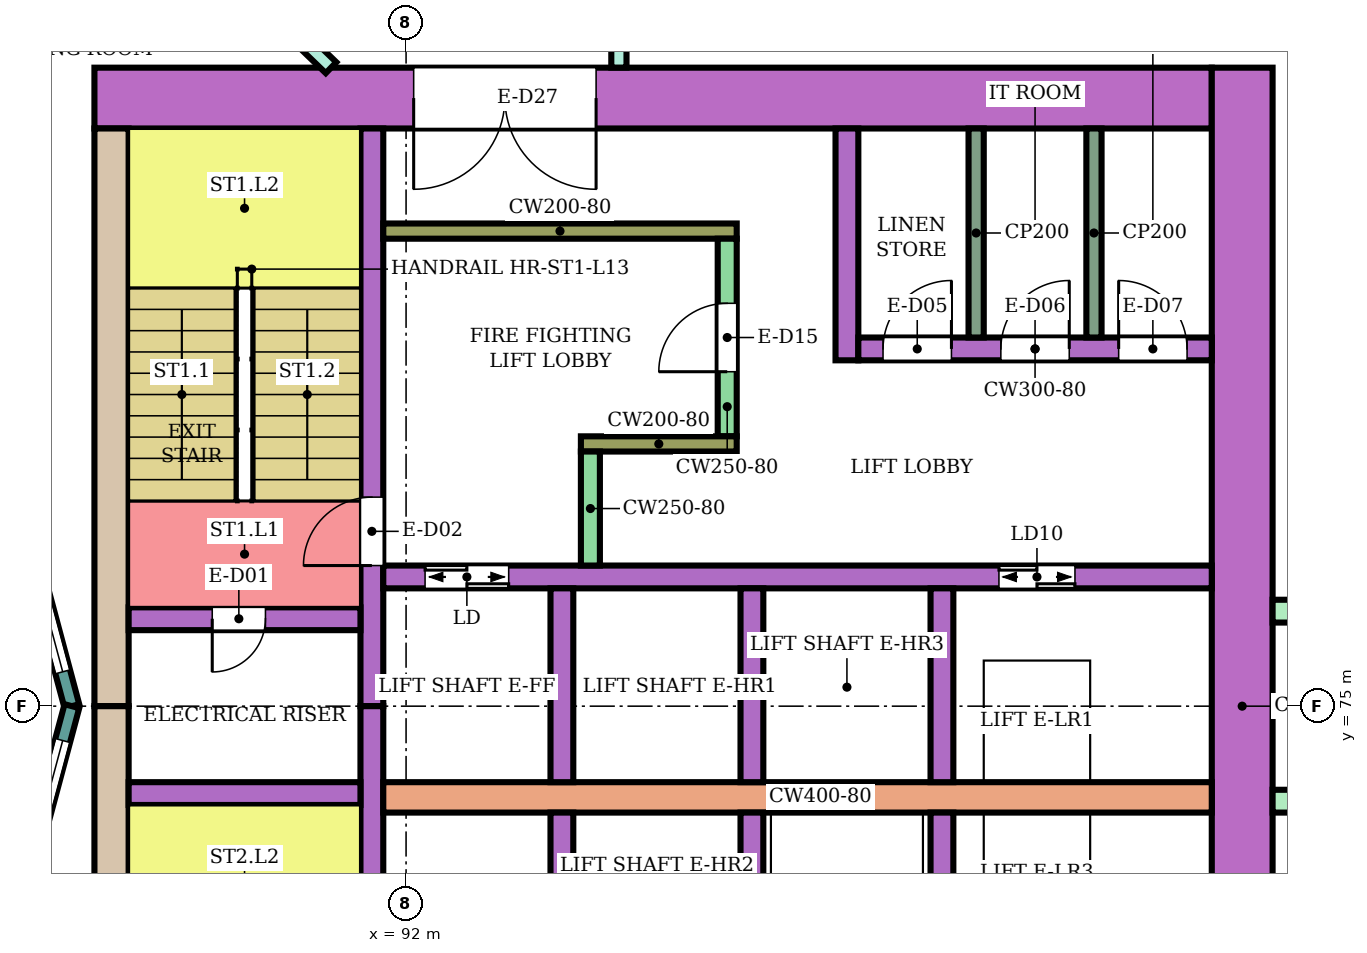
"""IFC4 building model, lengths in metres.
Left out: names, types, materials, properties, quantities, classifications, styles, units other than length and angle.
Written with IfcOpenShell. Run it as: python <this file> out.ifc"""

import sys

from ifc_helpers import new_model, si_unit, direction, frame, frame_2d, origin, place, context, subcontext, project, spatial, rectangle, extrude, element, fill, save


model = new_model("IFC4")
c1 = context("Model", 3, precision=1e-05, world=origin(), true_north=direction((0.0, 1.0)))
c2 = subcontext(c1, "Body", "Model", "MODEL_VIEW")
j1 = project(units=[si_unit("LENGTHUNIT", "METRE"), si_unit("PLANEANGLEUNIT", "RADIAN")], contexts=[c1])
p1 = place(None, origin())
s1 = spatial("IfcSite", under=j1, at=p1, CompositionType="ELEMENT")
p2 = place(p1, origin())
s2 = spatial("IfcBuilding", under=s1, at=p2, CompositionType="ELEMENT")
p3 = place(p2, frame((0.0, 0.0, 59.2)))
s3 = spatial("IfcBuildingStorey", under=s2, at=p3, CompositionType="ELEMENT", Elevation=59.2)
p4 = place(p3, frame((87.9, 83.0, 0.0), z_axis=(0.0, 0.0, 1.0), x_axis=(1.0, 0.0, 0.0)))
e1 = element("IfcWall", 1, at=p4, inside=s3, PredefinedType="SHEAR", context=c2, shape_type="SweptSolid", body=[
    extrude(rectangle(XDim=14.7, YDim=0.8, at=frame_2d((7.35, 0.0))), origin(), (0.0, 0.0, 1.0), 3.48),
])
p5 = place(p4, frame((4.2, 0.0, 0.0)))
e2 = element("IfcOpeningElement", 2, at=p5, cuts=e1, PredefinedType="OPENING", context=c2, shape_type="SweptSolid", body=[
    extrude(rectangle(XDim=2.4, YDim=2.4, at=frame_2d((1.2, 1.2))), frame((0.0, 0.41, 0.0), z_axis=(0.0, -1.0, 0.0), x_axis=(1.0, 0.0, 0.0)), (0.0, 0.0, 1.0), 0.82),
])
for number, where, z_axis, x_axis in (
    (3, (88.125, 75.0, 0.0), (0.0, 0.0, 1.0), (0.0, 1.0, 0.0)),
    (4, (88.125, 67.4, 0.0), (0.0, 0.0, 1.0), (0.0, 1.0, 0.0)),
):
    element("IfcWall", number, at=place(p3, frame(where, z_axis=z_axis, x_axis=x_axis)), inside=s3, PredefinedType="SHEAR", context=c2, shape_type="SweptSolid", body=[
        extrude(rectangle(XDim=7.6, YDim=0.45, at=frame_2d((3.8, 0.0))), origin(), (0.0, 0.0, 1.0), 3.48),
    ])
p6 = place(p3, frame((103.0, 66.6, 0.0), z_axis=(0.0, 0.0, 1.0), x_axis=(0.0, 1.0, 0.0)))
e5 = element("IfcWall", 5, at=p6, inside=s3, PredefinedType="SHEAR", context=c2, shape_type="SweptSolid", body=[
    extrude(rectangle(XDim=16.8, YDim=0.8, at=frame_2d((8.4, 0.0))), origin(), (0.0, 0.0, 1.0), 3.48),
])
p7 = place(p3, frame((91.55, 75.0, 0.0), z_axis=(0.0, 0.0, 1.0), x_axis=(0.0, 1.0, 0.0)))
e6 = element("IfcWall", 6, at=p7, inside=s3, PredefinedType="SHEAR", context=c2, shape_type="SweptSolid", body=[
    extrude(rectangle(XDim=7.6, YDim=0.3, at=frame_2d((3.8, 0.0))), origin(), (0.0, 0.0, 1.0), 3.48),
])
p8 = place(p7, frame((1.85, 0.0, 0.0)))
e7 = element("IfcOpeningElement", 7, at=p8, cuts=e6, PredefinedType="OPENING", context=c2, shape_type="SweptSolid", body=[
    extrude(rectangle(XDim=0.9, YDim=2.1, at=frame_2d((0.45, 1.05))), frame((0.0, 0.16, 0.0), z_axis=(0.0, -1.0, 0.0), x_axis=(1.0, 0.0, 0.0)), (0.0, 0.0, 1.0), 0.32),
])
p9 = place(p3, frame((91.55, 67.4, 0.0), z_axis=(0.0, 0.0, 1.0), x_axis=(0.0, 1.0, 0.0)))
e8 = element("IfcWall", 8, at=p9, inside=s3, PredefinedType="SHEAR", context=c2, shape_type="SweptSolid", body=[
    extrude(rectangle(XDim=7.6, YDim=0.3, at=frame_2d((3.8, 0.0))), origin(), (0.0, 0.0, 1.0), 3.48),
])
p10 = place(p9, frame((0.25, 0.0, 0.0)))
e9 = element("IfcOpeningElement", 9, at=p10, cuts=e8, PredefinedType="OPENING", context=c2, shape_type="SweptSolid", body=[
    extrude(rectangle(XDim=0.9, YDim=2.1, at=frame_2d((0.45, 1.05))), frame((0.0, 0.16, 0.0), z_axis=(0.0, -1.0, 0.0), x_axis=(1.0, 0.0, 0.0)), (0.0, 0.0, 1.0), 0.32),
])
p11 = place(p3, frame((88.35, 76.15, 0.0), z_axis=(0.0, 0.0, 1.0), x_axis=(1.0, 0.0, 0.0)))
e10 = element("IfcWall", 10, at=p11, inside=s3, PredefinedType="SHEAR", context=c2, shape_type="SweptSolid", body=[
    extrude(rectangle(XDim=3.05, YDim=0.3, at=frame_2d((1.525, 0.0))), origin(), (0.0, 0.0, 1.0), 3.48),
])
p12 = place(p11, frame((1.1, 0.0, 0.0)))
e11 = element("IfcOpeningElement", 11, at=p12, cuts=e10, PredefinedType="OPENING", context=c2, shape_type="SweptSolid", body=[
    extrude(rectangle(XDim=0.7, YDim=2.0, at=frame_2d((0.35, 1.0))), frame((0.0, 0.16, 0.0), z_axis=(0.0, -1.0, 0.0), x_axis=(1.0, 0.0, 0.0)), (0.0, 0.0, 1.0), 0.32),
])
p13 = place(p3, frame((88.35, 73.85, 0.0), z_axis=(0.0, 0.0, 1.0), x_axis=(1.0, 0.0, 0.0)))
e12 = element("IfcWall", 12, at=p13, inside=s3, PredefinedType="SHEAR", context=c2, shape_type="SweptSolid", body=[
    extrude(rectangle(XDim=3.05, YDim=0.3, at=frame_2d((1.525, 0.0))), origin(), (0.0, 0.0, 1.0), 3.48),
])
p14 = place(p3, frame((91.7, 76.7, 0.0), z_axis=(0.0, 0.0, 1.0), x_axis=(1.0, 0.0, 0.0)))
e13 = element("IfcWall", 13, at=p14, inside=s3, PredefinedType="SHEAR", context=c2, shape_type="SweptSolid", body=[
    extrude(rectangle(XDim=10.9, YDim=0.3, at=frame_2d((5.45, 0.0))), origin(), (0.0, 0.0, 1.0), 3.48),
])
p15 = place(p14, frame((0.55, 0.0, 0.0)))
e14 = element("IfcOpeningElement", 14, at=p15, cuts=e13, PredefinedType="OPENING", context=c2, shape_type="SweptSolid", body=[
    extrude(rectangle(XDim=1.1, YDim=2.1, at=frame_2d((0.55, 1.05))), frame((0.0, 0.16, 0.0), z_axis=(0.0, -1.0, 0.0), x_axis=(1.0, 0.0, 0.0)), (0.0, 0.0, 1.0), 0.32),
])
p16 = place(p14, frame((8.1, 0.0, 0.0)))
e15 = element("IfcOpeningElement", 15, at=p16, cuts=e13, PredefinedType="OPENING", context=c2, shape_type="SweptSolid", body=[
    extrude(rectangle(XDim=1.0, YDim=2.1, at=frame_2d((0.5, 1.05))), frame((0.0, 0.16, 0.0), z_axis=(0.0, -1.0, 0.0), x_axis=(1.0, 0.0, 0.0)), (0.0, 0.0, 1.0), 0.32),
])
p17 = place(p3, frame((91.7, 73.8, 0.0), z_axis=(0.0, 0.0, 1.0), x_axis=(1.0, 0.0, 0.0)))
e16 = element("IfcWall", 16, at=p17, inside=s3, PredefinedType="SHEAR", context=c2, shape_type="SweptSolid", body=[
    extrude(rectangle(XDim=10.9, YDim=0.4, at=frame_2d((5.45, 0.0))), origin(), (0.0, 0.0, 1.0), 3.48),
])
for number, where, z_axis, x_axis in (
    (17, (94.05, 74.0, 0.0), (0.0, 0.0, 1.0), (0.0, 1.0, 0.0)),
    (18, (96.55, 74.0, 0.0), (0.0, 0.0, 1.0), (0.0, 1.0, 0.0)),
    (19, (99.05, 74.0, 0.0), (0.0, 0.0, 1.0), (0.0, 1.0, 0.0)),
    (20, (94.05, 71.05, 0.0), (0.0, 0.0, 1.0), (0.0, 1.0, 0.0)),
    (21, (96.55, 71.05, 0.0), (0.0, 0.0, 1.0), (0.0, 1.0, 0.0)),
    (22, (99.05, 71.05, 0.0), (0.0, 0.0, 1.0), (0.0, 1.0, 0.0)),
):
    element("IfcWall", number, at=place(p3, frame(where, z_axis=z_axis, x_axis=x_axis)), inside=s3, PredefinedType="SHEAR", context=c2, shape_type="SweptSolid", body=[
        extrude(rectangle(XDim=2.55, YDim=0.3, at=frame_2d((1.275, 0.0))), origin(), (0.0, 0.0, 1.0), 3.48),
    ])
p18 = place(p3, frame((91.7, 81.25, 0.0), z_axis=(0.0, 0.0, 1.0), x_axis=(1.0, 0.0, 0.0)))
e23 = element("IfcWall", 23, at=p18, inside=s3, PredefinedType="SHEAR", context=c2, shape_type="SweptSolid", body=[
    extrude(rectangle(XDim=4.65, YDim=0.2, at=frame_2d((2.325, 0.0))), origin(), (0.0, 0.0, 1.0), 3.48),
])
p19 = place(p3, frame((96.225, 78.55, 0.0), z_axis=(0.0, 0.0, 1.0), x_axis=(0.0, 1.0, 0.0)))
e24 = element("IfcWall", 24, at=p19, inside=s3, PredefinedType="SHEAR", context=c2, shape_type="SweptSolid", body=[
    extrude(rectangle(XDim=2.6, YDim=0.25, at=frame_2d((1.3, 0.0))), origin(), (0.0, 0.0, 1.0), 3.48),
])
p20 = place(p19, frame((0.85, 0.0, 0.0)))
e25 = element("IfcOpeningElement", 25, at=p20, cuts=e24, PredefinedType="OPENING", context=c2, shape_type="SweptSolid", body=[
    extrude(rectangle(XDim=0.9, YDim=2.1, at=frame_2d((0.45, 1.05))), frame((0.0, 0.135, 0.0), z_axis=(0.0, -1.0, 0.0), x_axis=(1.0, 0.0, 0.0)), (0.0, 0.0, 1.0), 0.27),
])
p21 = place(p3, frame((94.3, 78.45, 0.0), z_axis=(0.0, 0.0, 1.0), x_axis=(1.0, 0.0, 0.0)))
e26 = element("IfcWall", 26, at=p21, inside=s3, PredefinedType="SHEAR", context=c2, shape_type="SweptSolid", body=[
    extrude(rectangle(XDim=2.05, YDim=0.2, at=frame_2d((1.025, 0.0))), origin(), (0.0, 0.0, 1.0), 3.48),
])
p22 = place(p3, frame((94.425, 76.85, 0.0), z_axis=(0.0, 0.0, 1.0), x_axis=(0.0, 1.0, 0.0)))
e27 = element("IfcWall", 27, at=p22, inside=s3, PredefinedType="SHEAR", context=c2, shape_type="SweptSolid", body=[
    extrude(rectangle(XDim=1.5, YDim=0.25, at=frame_2d((0.75, 0.0))), origin(), (0.0, 0.0, 1.0), 3.48),
])
p23 = place(p3, frame((97.8, 79.55, 0.0), z_axis=(0.0, 0.0, 1.0), x_axis=(0.0, 1.0, 0.0)))
e28 = element("IfcWall", 28, at=p23, inside=s3, PredefinedType="SHEAR", context=c2, shape_type="SweptSolid", body=[
    extrude(rectangle(XDim=3.05, YDim=0.3, at=frame_2d((1.525, 0.0))), origin(), (0.0, 0.0, 1.0), 3.48),
])
p24 = place(p3, frame((97.95, 79.7, 0.0), z_axis=(0.0, 0.0, 1.0), x_axis=(1.0, 0.0, 0.0)))
e29 = element("IfcWall", 29, at=p24, inside=s3, PredefinedType="SHEAR", context=c2, shape_type="SweptSolid", body=[
    extrude(rectangle(XDim=4.65, YDim=0.3, at=frame_2d((2.325, 0.0))), origin(), (0.0, 0.0, 1.0), 3.48),
])
p25 = place(p24, frame((0.325, 0.0, 0.0)))
e30 = element("IfcOpeningElement", 30, at=p25, cuts=e29, PredefinedType="OPENING", context=c2, shape_type="SweptSolid", body=[
    extrude(rectangle(XDim=0.9, YDim=2.1, at=frame_2d((0.45, 1.05))), frame((0.0, 0.16, 0.0), z_axis=(0.0, -1.0, 0.0), x_axis=(1.0, 0.0, 0.0)), (0.0, 0.0, 1.0), 0.32),
])
p26 = place(p24, frame((1.875, 0.0, 0.0)))
e31 = element("IfcOpeningElement", 31, at=p26, cuts=e29, PredefinedType="OPENING", context=c2, shape_type="SweptSolid", body=[
    extrude(rectangle(XDim=0.9, YDim=2.1, at=frame_2d((0.45, 1.05))), frame((0.0, 0.16, 0.0), z_axis=(0.0, -1.0, 0.0), x_axis=(1.0, 0.0, 0.0)), (0.0, 0.0, 1.0), 0.32),
])
p27 = place(p24, frame((3.425, 0.0, 0.0)))
e32 = element("IfcOpeningElement", 32, at=p27, cuts=e29, PredefinedType="OPENING", context=c2, shape_type="SweptSolid", body=[
    extrude(rectangle(XDim=0.9, YDim=2.1, at=frame_2d((0.45, 1.05))), frame((0.0, 0.16, 0.0), z_axis=(0.0, -1.0, 0.0), x_axis=(1.0, 0.0, 0.0)), (0.0, 0.0, 1.0), 0.32),
])
for number, where, z_axis, x_axis in (
    (33, (103.4, 73.75, 0.0), (0.0, 0.0, 1.0), (1.0, 0.0, 0.0)),
    (34, (103.4, 76.25, 0.0), (0.0, 0.0, 1.0), (1.0, 0.0, 0.0)),
):
    element("IfcWall", number, at=place(p3, frame(where, z_axis=z_axis, x_axis=x_axis)), inside=s3, PredefinedType="NOTDEFINED", context=c2, shape_type="SweptSolid", body=[
        extrude(rectangle(XDim=2.416, YDim=0.3, at=frame_2d((1.208, 0.0))), origin(), (0.0, 0.0, 1.0), 3.8),
    ])
p28 = place(p3, frame((87.604, 75.0, 0.0), z_axis=(0.0, 0.0, 1.0), x_axis=(-0.258789828301, 0.965933654434, 0.0)))
e35 = element("IfcWall", 35, at=p28, inside=s3, PredefinedType="NOTDEFINED", context=c2, shape_type="SweptSolid", body=[
    extrude(rectangle(XDim=3.936, YDim=0.2, at=frame_2d((1.968, 0.0))), origin(), (0.0, 0.0, 1.0), 3.8),
])
p29 = place(p28, frame((0.468, 0.0, 0.9)))
e36 = element("IfcOpeningElement", 36, at=p29, cuts=e35, PredefinedType="OPENING", context=c2, shape_type="SweptSolid", body=[
    extrude(rectangle(XDim=3.0, YDim=2.3, at=frame_2d((1.5, 1.15))), frame((0.0, 0.11, 0.0), z_axis=(0.0, -1.0, 0.0), x_axis=(1.0, 0.0, 0.0)), (0.0, 0.0, 1.0), 0.22),
])
p30 = place(p3, frame((86.585, 71.198, 0.0), z_axis=(0.0, 0.0, 1.0), x_axis=(0.258789828301, 0.965933654434, 0.0)))
e37 = element("IfcWall", 37, at=p30, inside=s3, PredefinedType="NOTDEFINED", context=c2, shape_type="SweptSolid", body=[
    extrude(rectangle(XDim=3.936, YDim=0.2, at=frame_2d((1.968, 0.0))), origin(), (0.0, 0.0, 1.0), 3.8),
])
p31 = place(p30, frame((0.468, 0.0, 0.9)))
e38 = element("IfcOpeningElement", 38, at=p31, cuts=e37, PredefinedType="OPENING", context=c2, shape_type="SweptSolid", body=[
    extrude(rectangle(XDim=3.0, YDim=2.3, at=frame_2d((1.5, 1.15))), frame((0.0, 0.11, 0.0), z_axis=(0.0, -1.0, 0.0), x_axis=(1.0, 0.0, 0.0)), (0.0, 0.0, 1.0), 0.22),
])
p32 = place(p3, frame((87.064, 87.211, 0.0), z_axis=(0.0, 0.0, 1.0), x_axis=(0.719562412484, -0.694427774891, 0.0)))
e39 = element("IfcWall", 39, at=p32, inside=s3, PredefinedType="PARTITIONING", context=c2, shape_type="SweptSolid", body=[
    extrude(rectangle(XDim=5.488, YDim=0.2, at=frame_2d((2.744, 0.0))), origin(), (0.0, 0.0, 1.0), 3.35),
])
p33 = place(p32, frame((2.294, 0.0, 0.0)))
e40 = element("IfcOpeningElement", 40, at=p33, cuts=e39, PredefinedType="OPENING", context=c2, shape_type="SweptSolid", body=[
    extrude(rectangle(XDim=0.9, YDim=2.1, at=frame_2d((0.45, 1.05))), frame((0.0, 0.11, 0.0), z_axis=(0.0, -1.0, 0.0), x_axis=(1.0, 0.0, 0.0)), (0.0, 0.0, 1.0), 0.22),
])
p34 = place(p3, frame((94.8, 83.401, 0.0), z_axis=(0.0, 0.0, 1.0), x_axis=(0.0, 1.0, 0.0)))
e41 = element("IfcWall", 41, at=p34, inside=s3, PredefinedType="PARTITIONING", context=c2, shape_type="SweptSolid", body=[
    extrude(rectangle(XDim=1.499, YDim=0.2, at=frame_2d((0.75, 0.0))), origin(), (0.0, 0.0, 1.0), 3.35),
])
for number, where, z_axis, x_axis in (
    (42, (99.5, 79.85, 0.0), (0.0, 0.0, 1.0), (0.0, 1.0, 0.0)),
    (43, (101.05, 79.85, 0.0), (0.0, 0.0, 1.0), (0.0, 1.0, 0.0)),
):
    element("IfcWall", number, at=place(p3, frame(where, z_axis=z_axis, x_axis=x_axis)), inside=s3, PredefinedType="PARTITIONING", context=c2, shape_type="SweptSolid", body=[
        extrude(rectangle(XDim=2.75, YDim=0.2, at=frame_2d((1.375, 0.0))), origin(), (0.0, 0.0, 1.0), 3.48),
    ])
p35 = place(p29, origin())
e44 = element("IfcWindow", 44, at=p35, inside=s3, PartitioningType="SINGLE_PANEL", PredefinedType="WINDOW", context=c2, shape_type="SweptSolid", body=[
    extrude(rectangle(XDim=3.0, YDim=2.3, at=frame_2d((1.5, 1.15))), frame((0.0, 0.03, 0.0), z_axis=(0.0, -1.0, 0.0), x_axis=(1.0, 0.0, 0.0)), (0.0, 0.0, 1.0), 0.06),
])
fill(e36, e44)
p36 = place(p31, origin())
e45 = element("IfcWindow", 45, at=p36, inside=s3, PartitioningType="SINGLE_PANEL", PredefinedType="WINDOW", context=c2, shape_type="SweptSolid", body=[
    extrude(rectangle(XDim=3.0, YDim=2.3, at=frame_2d((1.5, 1.15))), frame((0.0, 0.03, 0.0), z_axis=(0.0, -1.0, 0.0), x_axis=(1.0, 0.0, 0.0)), (0.0, 0.0, 1.0), 0.06),
])
fill(e38, e45)
p37 = place(p12, frame((0.7, 0.0, 0.0), z_axis=(0.0, 0.0, 1.0), x_axis=(-1.0, 0.0, 0.0)))
e46 = element("IfcDoor", 46, at=p37, inside=s3, OperationType="SINGLE_SWING_RIGHT", PredefinedType="DOOR", context=c2, shape_type="SweptSolid", body=[
    extrude(rectangle(XDim=0.7, YDim=2.0, at=frame_2d((0.35, 1.0))), frame((0.0, 0.025, 0.0), z_axis=(0.0, -1.0, 0.0), x_axis=(1.0, 0.0, 0.0)), (0.0, 0.0, 1.0), 0.05),
])
fill(e11, e46)
p38 = place(p8, origin())
e47 = element("IfcDoor", 47, at=p38, inside=s3, OperationType="SINGLE_SWING_LEFT", PredefinedType="DOOR", context=c2, shape_type="SweptSolid", body=[
    extrude(rectangle(XDim=0.9, YDim=2.1, at=frame_2d((0.45, 1.05))), frame((0.0, 0.025, 0.0), z_axis=(0.0, -1.0, 0.0), x_axis=(1.0, 0.0, 0.0)), (0.0, 0.0, 1.0), 0.05),
])
fill(e7, e47)
p39 = place(p15, origin())
e48 = element("IfcDoor", 48, at=p39, inside=s3, OperationType="DOUBLE_DOOR_SLIDING", PredefinedType="DOOR", context=c2, shape_type="SweptSolid", body=[
    extrude(rectangle(XDim=1.1, YDim=2.1, at=frame_2d((0.55, 1.05))), frame((0.0, 0.025, 0.0), z_axis=(0.0, -1.0, 0.0), x_axis=(1.0, 0.0, 0.0)), (0.0, 0.0, 1.0), 0.05),
])
fill(e14, e48)
p40 = place(p16, origin())
e49 = element("IfcDoor", 49, at=p40, inside=s3, OperationType="DOUBLE_DOOR_SLIDING", PredefinedType="DOOR", context=c2, shape_type="SweptSolid", body=[
    extrude(rectangle(XDim=1.0, YDim=2.1, at=frame_2d((0.5, 1.05))), frame((0.0, 0.025, 0.0), z_axis=(0.0, -1.0, 0.0), x_axis=(1.0, 0.0, 0.0)), (0.0, 0.0, 1.0), 0.05),
])
fill(e15, e49)
p41 = place(p20, origin())
e50 = element("IfcDoor", 50, at=p41, inside=s3, OperationType="SINGLE_SWING_LEFT", PredefinedType="DOOR", context=c2, shape_type="SweptSolid", body=[
    extrude(rectangle(XDim=0.9, YDim=2.1, at=frame_2d((0.45, 1.05))), frame((0.0, 0.025, 0.0), z_axis=(0.0, -1.0, 0.0), x_axis=(1.0, 0.0, 0.0)), (0.0, 0.0, 1.0), 0.05),
])
fill(e25, e50)
p42 = place(p25, origin())
e51 = element("IfcDoor", 51, at=p42, inside=s3, OperationType="SINGLE_SWING_RIGHT", PredefinedType="DOOR", context=c2, shape_type="SweptSolid", body=[
    extrude(rectangle(XDim=0.9, YDim=2.1, at=frame_2d((0.45, 1.05))), frame((0.0, 0.025, 0.0), z_axis=(0.0, -1.0, 0.0), x_axis=(1.0, 0.0, 0.0)), (0.0, 0.0, 1.0), 0.05),
])
fill(e30, e51)
p43 = place(p26, origin())
e52 = element("IfcDoor", 52, at=p43, inside=s3, OperationType="SINGLE_SWING_RIGHT", PredefinedType="DOOR", context=c2, shape_type="SweptSolid", body=[
    extrude(rectangle(XDim=0.9, YDim=2.1, at=frame_2d((0.45, 1.05))), frame((0.0, 0.025, 0.0), z_axis=(0.0, -1.0, 0.0), x_axis=(1.0, 0.0, 0.0)), (0.0, 0.0, 1.0), 0.05),
])
fill(e31, e52)
p44 = place(p27, origin())
e53 = element("IfcDoor", 53, at=p44, inside=s3, OperationType="SINGLE_SWING_LEFT", PredefinedType="DOOR", context=c2, shape_type="SweptSolid", body=[
    extrude(rectangle(XDim=0.9, YDim=2.1, at=frame_2d((0.45, 1.05))), frame((0.0, 0.025, 0.0), z_axis=(0.0, -1.0, 0.0), x_axis=(1.0, 0.0, 0.0)), (0.0, 0.0, 1.0), 0.05),
])
fill(e32, e53)
p45 = place(p5, frame((2.4, 0.0, 0.0), z_axis=(0.0, 0.0, 1.0), x_axis=(-1.0, 0.0, 0.0)))
e54 = element("IfcDoor", 54, at=p45, inside=s3, OperationType="DOUBLE_DOOR_SINGLE_SWING", PredefinedType="DOOR", context=c2, shape_type="SweptSolid", body=[
    extrude(rectangle(XDim=2.4, YDim=2.4, at=frame_2d((1.2, 1.2))), frame((0.0, 0.025, 0.0), z_axis=(0.0, -1.0, 0.0), x_axis=(1.0, 0.0, 0.0)), (0.0, 0.0, 1.0), 0.05),
])
fill(e2, e54)
save(model, sys.argv[1])
